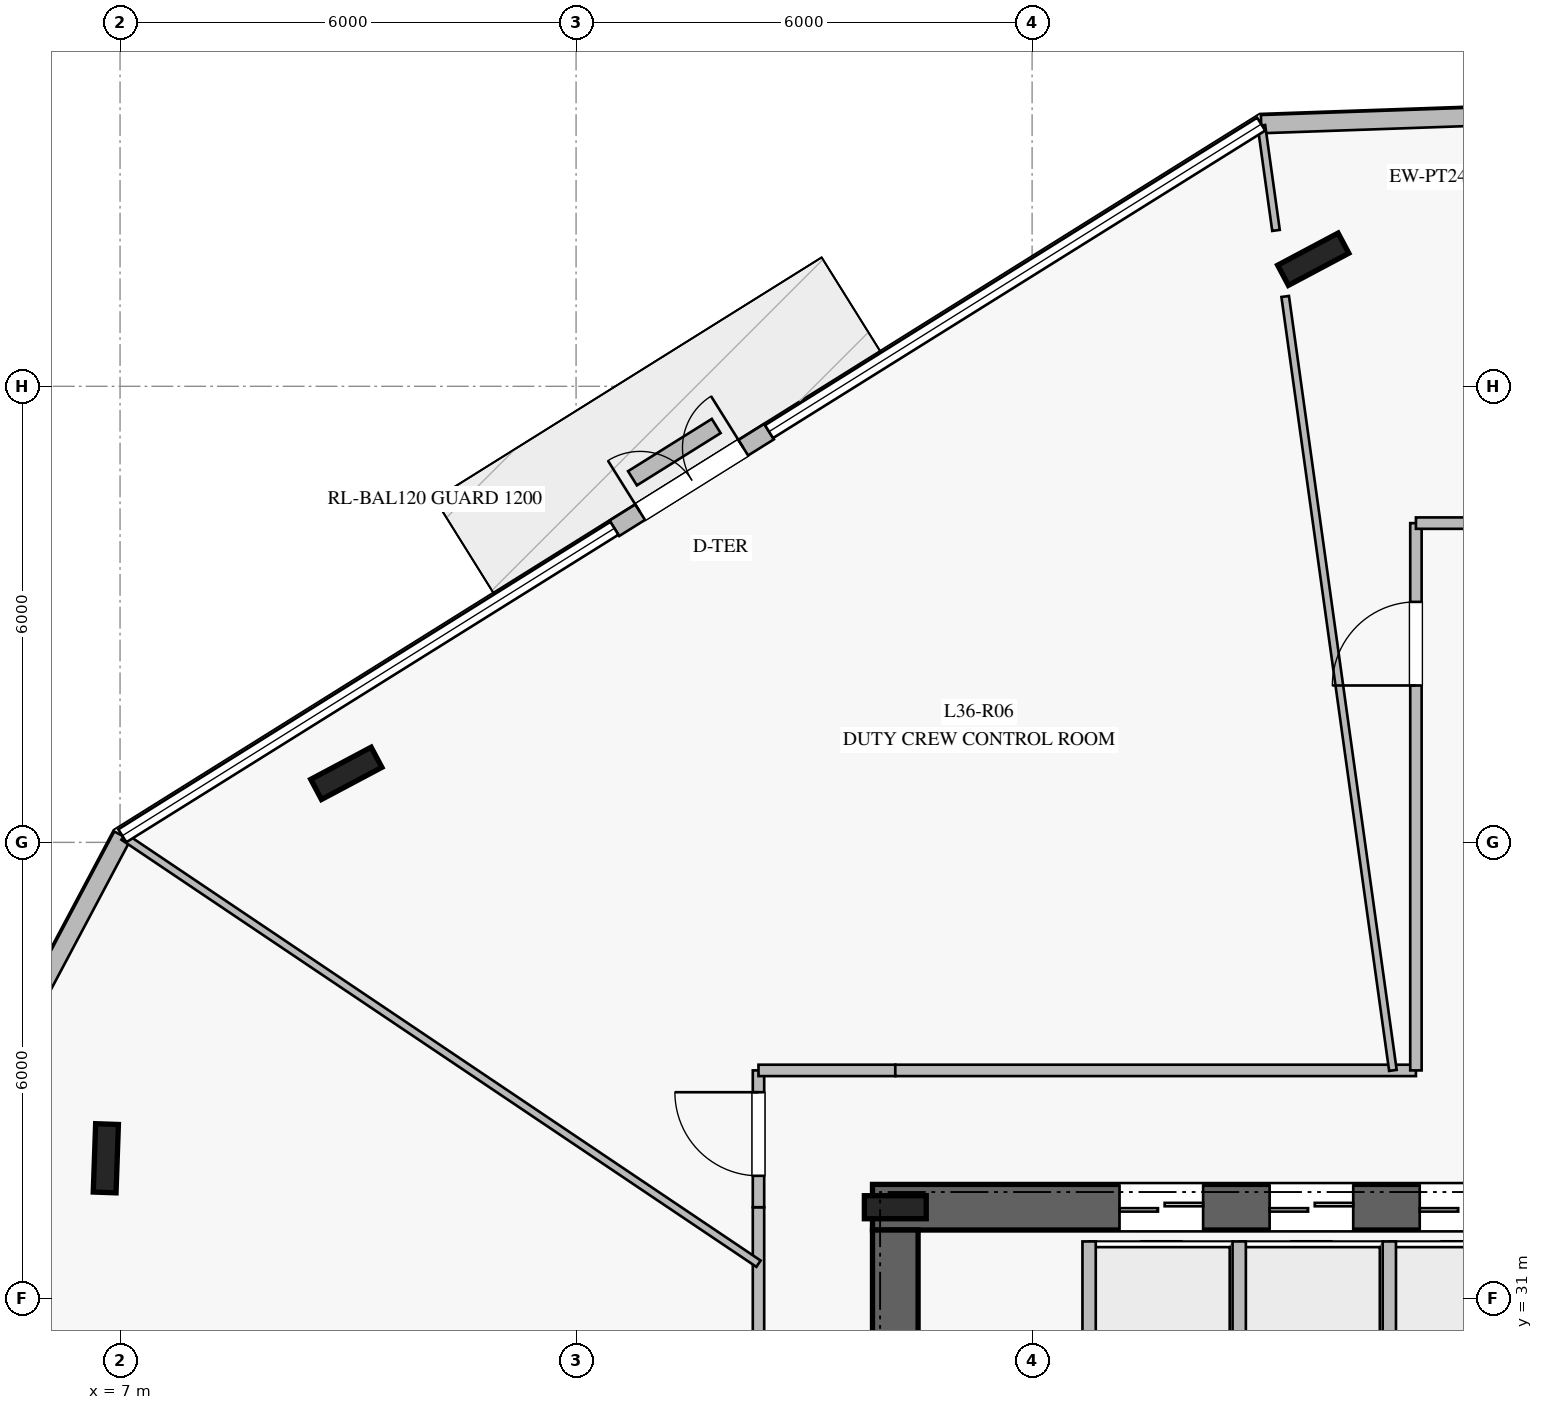
"""IFC4 building model, lengths in metres.
Left out: names, types, materials, properties, quantities, classifications, styles, units other than length and angle.
Written with IfcOpenShell. Run it as: python <this file> out.ifc"""

import sys

from ifc_helpers import new_model, si_unit, direction, frame, frame_2d, origin, origin_2d, place, context, subcontext, project, spatial, rectangle, i_section, extrude, element, fill, save


model = new_model("IFC4")
c1 = context("Model", 3, precision=1e-05, world=origin(), true_north=direction((0.0, 1.0)))
c2 = subcontext(c1, "Body", "Model", "MODEL_VIEW")
j1 = project(units=[si_unit("LENGTHUNIT", "METRE"), si_unit("PLANEANGLEUNIT", "RADIAN")], contexts=[c1])
p1 = place(None, origin())
s1 = spatial("IfcSite", under=j1, at=p1, CompositionType="ELEMENT")
p2 = place(p1, origin())
s2 = spatial("IfcBuilding", under=s1, at=p2, CompositionType="ELEMENT")
p3 = place(p2, frame((0.0, 0.0, 150.4)))
s3 = spatial("IfcBuildingStorey", under=s2, at=p3, CompositionType="ELEMENT", Elevation=150.4)
p4 = place(p3, frame((33.1, 32.2, 0.0), z_axis=(0.0, 0.0, 1.0), x_axis=(-1.0, 0.0, 0.0)))
e1 = element("IfcWall", 1, at=p4, inside=s3, PredefinedType="SHEAR", context=c2, shape_type="SweptSolid", body=[
    extrude(rectangle(XDim=16.2, YDim=0.6, at=frame_2d((8.1, 0.0))), origin(), (0.0, 0.0, 1.0), 3.76),
])
p5 = place(p4, frame((5.05, 0.0, 0.0)))
e2 = element("IfcOpeningElement", 2, at=p5, cuts=e1, PredefinedType="OPENING", context=c2, shape_type="SweptSolid", body=[
    extrude(rectangle(XDim=1.2, YDim=2.25, at=frame_2d((0.6, 1.125))), frame((0.0, 0.31, 0.0), z_axis=(0.0, -1.0, 0.0), x_axis=(1.0, 0.0, 0.0)), (0.0, 0.0, 1.0), 0.62),
])
p6 = place(p4, frame((11.85, 0.0, 0.0)))
e3 = element("IfcOpeningElement", 3, at=p6, cuts=e1, PredefinedType="OPENING", context=c2, shape_type="SweptSolid", body=[
    extrude(rectangle(XDim=1.1, YDim=2.2, at=frame_2d((0.55, 1.1))), frame((0.0, 0.31, 0.0), z_axis=(0.0, -1.0, 0.0), x_axis=(1.0, 0.0, 0.0)), (0.0, 0.0, 1.0), 0.62),
])
p7 = place(p4, frame((9.875, 0.0, 0.0)))
e4 = element("IfcOpeningElement", 4, at=p7, cuts=e1, PredefinedType="OPENING", context=c2, shape_type="SweptSolid", body=[
    extrude(rectangle(XDim=1.1, YDim=2.2, at=frame_2d((0.55, 1.1))), frame((0.0, 0.31, 0.0), z_axis=(0.0, -1.0, 0.0), x_axis=(1.0, 0.0, 0.0)), (0.0, 0.0, 1.0), 0.62),
])
p8 = place(p4, frame((7.9, 0.0, 0.0)))
e5 = element("IfcOpeningElement", 5, at=p8, cuts=e1, PredefinedType="OPENING", context=c2, shape_type="SweptSolid", body=[
    extrude(rectangle(XDim=1.1, YDim=2.2, at=frame_2d((0.55, 1.1))), frame((0.0, 0.31, 0.0), z_axis=(0.0, -1.0, 0.0), x_axis=(1.0, 0.0, 0.0)), (0.0, 0.0, 1.0), 0.62),
])
p9 = place(p3, frame((17.2, 31.9, 0.0), z_axis=(0.0, 0.0, 1.0), x_axis=(0.0, -1.0, 0.0)))
e6 = element("IfcWall", 6, at=p9, inside=s3, PredefinedType="SHEAR", context=c2, shape_type="SweptSolid", body=[
    extrude(rectangle(XDim=13.8, YDim=0.6, at=frame_2d((6.9, 0.0))), origin(), (0.0, 0.0, 1.0), 3.76),
])
p10 = place(p9, frame((2.05, 0.0, 0.0)))
e7 = element("IfcOpeningElement", 7, at=p10, cuts=e6, PredefinedType="OPENING", context=c2, shape_type="SweptSolid", body=[
    extrude(rectangle(XDim=1.5, YDim=2.2, at=frame_2d((0.75, 1.1))), frame((0.0, 0.31, 0.0), z_axis=(0.0, -1.0, 0.0), x_axis=(1.0, 0.0, 0.0)), (0.0, 0.0, 1.0), 0.62),
])
p11 = place(p3, frame((17.2, 32.2, 0.0), z_axis=(0.0, 0.0, 1.0), x_axis=(1.0, 0.0, 0.0)))
e8 = element("IfcColumn", 8, at=p11, inside=s3, PredefinedType="COLUMN", context=c2, shape_type="SweptSolid", body=[
    extrude(i_section(OverallWidth=0.303, OverallDepth=0.814, WebThickness=0.021, FlangeThickness=0.04, at=origin_2d()), origin(), (0.0, 0.0, 1.0), 4.0),
])
for number, where, z_axis, x_axis in (
    (9, (22.699, 44.672, 0.0), (0.0, 0.0, 1.0), (0.883, 0.469, 0.0)),
    (10, (9.977, 37.908, 0.0), (0.0, 0.0, 1.0), (0.883, 0.469, 0.0)),
    (11, (6.813, 32.844, 0.0), (0.0, 0.0, 1.0), (0.035, 0.999, 0.0)),
):
    element("IfcColumn", number, at=place(p3, frame(where, z_axis=z_axis, x_axis=x_axis)), inside=s3, PredefinedType="COLUMN", context=c2, shape_type="SweptSolid", body=[
        extrude(i_section(OverallWidth=0.3, OverallDepth=0.9, WebThickness=0.019, FlangeThickness=0.035, at=origin_2d()), origin(), (0.0, 0.0, 1.0), 4.0),
    ])
p12 = place(p3, frame((26.482, 46.605, 0.0), z_axis=(0.0, 0.0, 1.0), x_axis=(-0.999390988908, -0.034894860495, 0.0)))
e12 = element("IfcWall", 12, at=p12, inside=s3, PredefinedType="STANDARD", context=c2, shape_type="SweptSolid", body=[
    extrude(rectangle(XDim=4.471, YDim=0.24, at=frame_2d((2.235, 0.0))), origin(), (0.0, 0.0, 1.0), 3.76),
])
p13 = place(p3, frame((15.539, 42.404, 0.0), z_axis=(0.0, 0.0, 1.0), x_axis=(-0.847998304005, -0.529998940003, 0.0)))
e13 = element("IfcWall", 13, at=p13, inside=s3, PredefinedType="STANDARD", context=c2, shape_type="SweptSolid", body=[
    extrude(rectangle(XDim=2.4, YDim=0.24, at=frame_2d((1.2, 0.0))), origin(), (0.0, 0.0, 1.0), 3.76),
])
p14 = place(p13, frame((0.4, 0.0, 0.0)))
e14 = element("IfcOpeningElement", 14, at=p14, cuts=e13, PredefinedType="OPENING", context=c2, shape_type="SweptSolid", body=[
    extrude(rectangle(XDim=1.6, YDim=2.25, at=frame_2d((0.8, 1.125))), frame((0.0, 0.13, 0.0), z_axis=(0.0, -1.0, 0.0), x_axis=(1.0, 0.0, 0.0)), (0.0, 0.0, 1.0), 0.26),
])
p15 = place(p3, frame((7.03, 37.087, 0.0), z_axis=(0.0, 0.0, 1.0), x_axis=(-0.46919913514, -0.883092391307, 0.0)))
e15 = element("IfcWall", 15, at=p15, inside=s3, PredefinedType="STANDARD", context=c2, shape_type="SweptSolid", body=[
    extrude(rectangle(XDim=4.472, YDim=0.24, at=frame_2d((2.236, 0.0))), origin(), (0.0, 0.0, 1.0), 3.76),
])
p16 = place(p3, frame((14.844, 42.478, 0.0), z_axis=(0.0, 0.0, 1.0), x_axis=(-0.848272680747, -0.52955968417, 0.0)))
e16 = element("IfcWall", 16, at=p16, inside=s3, PredefinedType="USERDEFINED", context=c2, shape_type="SweptSolid", body=[
    extrude(rectangle(XDim=1.299, YDim=0.22, at=frame_2d((0.649, 0.0))), origin(), (0.0, 0.0, 1.0), 0.4),
])
for number, where, z_axis, x_axis in (
    (17, (19.75, 29.4, 0.0), (0.0, 0.0, 1.0), (0.0, 1.0, 0.0)),
    (18, (21.725, 29.4, 0.0), (0.0, 0.0, 1.0), (0.0, 1.0, 0.0)),
    (19, (23.7, 29.4, 0.0), (0.0, 0.0, 1.0), (0.0, 1.0, 0.0)),
):
    element("IfcWall", number, at=place(p3, frame(where, z_axis=z_axis, x_axis=x_axis)), inside=s3, PredefinedType="PARTITIONING", context=c2, shape_type="SweptSolid", body=[
        extrude(rectangle(XDim=2.35, YDim=0.175, at=frame_2d((1.175, 0.0))), origin(), (0.0, 0.0, 1.0), 3.76),
    ])
p17 = place(p3, frame((15.4, 25.95, 0.0), z_axis=(0.0, 0.0, 1.0), x_axis=(0.0, 1.0, 0.0)))
e20 = element("IfcWall", 20, at=p17, inside=s3, PredefinedType="PARTITIONING", context=c2, shape_type="SweptSolid", body=[
    extrude(rectangle(XDim=6.25, YDim=0.15, at=frame_2d((3.125, 0.0))), origin(), (0.0, 0.0, 1.0), 3.21),
])
p18 = place(p3, frame((15.4, 32.2, 0.0), z_axis=(0.0, 0.0, 1.0), x_axis=(0.0, 1.0, 0.0)))
e21 = element("IfcWall", 21, at=p18, inside=s3, PredefinedType="PARTITIONING", context=c2, shape_type="SweptSolid", body=[
    extrude(rectangle(XDim=1.8, YDim=0.15, at=frame_2d((0.9, 0.0))), origin(), (0.0, 0.0, 1.0), 3.21),
])
p19 = place(p18, frame((0.413, 0.0, 0.0)))
e22 = element("IfcOpeningElement", 22, at=p19, cuts=e21, PredefinedType="OPENING", context=c2, shape_type="SweptSolid", body=[
    extrude(rectangle(XDim=1.1, YDim=2.2, at=frame_2d((0.55, 1.1))), frame((0.0, 0.085, 0.0), z_axis=(0.0, -1.0, 0.0), x_axis=(1.0, 0.0, 0.0)), (0.0, 0.0, 1.0), 0.17),
])
p20 = place(p3, frame((15.4, 34.0, 0.0), z_axis=(0.0, 0.0, 1.0), x_axis=(1.0, 0.0, 0.0)))
e23 = element("IfcWall", 23, at=p20, inside=s3, PredefinedType="PARTITIONING", context=c2, shape_type="SweptSolid", body=[
    extrude(rectangle(XDim=1.8, YDim=0.15, at=frame_2d((0.9, 0.0))), origin(), (0.0, 0.0, 1.0), 3.76),
])
p21 = place(p3, frame((17.2, 34.0, 0.0), z_axis=(0.0, 0.0, 1.0), x_axis=(1.0, 0.0, 0.0)))
e24 = element("IfcWall", 24, at=p21, inside=s3, PredefinedType="PARTITIONING", context=c2, shape_type="SweptSolid", body=[
    extrude(rectangle(XDim=6.85, YDim=0.15, at=frame_2d((3.425, 0.0))), origin(), (0.0, 0.0, 1.0), 3.21),
])
p22 = place(p3, frame((24.05, 34.0, 0.0), z_axis=(0.0, 0.0, 1.0), x_axis=(0.0, 1.0, 0.0)))
e25 = element("IfcWall", 25, at=p22, inside=s3, PredefinedType="PARTITIONING", context=c2, shape_type="SweptSolid", body=[
    extrude(rectangle(XDim=7.2, YDim=0.15, at=frame_2d((3.6, 0.0))), origin(), (0.0, 0.0, 1.0), 3.36),
])
p23 = place(p22, frame((5.064, 0.0, 0.0)))
e26 = element("IfcOpeningElement", 26, at=p23, cuts=e25, PredefinedType="OPENING", context=c2, shape_type="SweptSolid", body=[
    extrude(rectangle(XDim=1.1, YDim=2.2, at=frame_2d((0.55, 1.1))), frame((0.0, 0.085, 0.0), z_axis=(0.0, -1.0, 0.0), x_axis=(1.0, 0.0, 0.0)), (0.0, 0.0, 1.0), 0.17),
])
p24 = place(p3, frame((24.05, 41.2, 0.0), z_axis=(0.0, 0.0, 1.0), x_axis=(1.0, 0.0, 0.0)))
e27 = element("IfcWall", 27, at=p24, inside=s3, PredefinedType="PARTITIONING", context=c2, shape_type="SweptSolid", body=[
    extrude(rectangle(XDim=1.9, YDim=0.15, at=frame_2d((0.95, 0.0))), origin(), (0.0, 0.0, 1.0), 3.76),
])
p25 = place(p3, frame((23.747, 34.0, 0.0), z_axis=(0.0, 0.0, 1.0), x_axis=(-0.137839547671, 0.990454571951, 0.0)))
e28 = element("IfcWall", 28, at=p25, inside=s3, PredefinedType="MOVABLE", context=c2, shape_type="SweptSolid", body=[
    extrude(rectangle(XDim=10.28, YDim=0.1, at=frame_2d((5.14, 0.0))), origin(), (0.0, 0.0, 1.0), 3.16),
])
p26 = place(p3, frame((22.209, 45.051, 0.0), z_axis=(0.0, 0.0, 1.0), x_axis=(-0.137740294841, 0.990468379696, 0.0)))
e29 = element("IfcWall", 29, at=p26, inside=s3, PredefinedType="MOVABLE", context=c2, shape_type="SweptSolid", body=[
    extrude(rectangle(XDim=1.393, YDim=0.1, at=frame_2d((0.697, 0.0))), origin(), (0.0, 0.0, 1.0), 3.76),
])
p27 = place(p3, frame((15.4, 31.457, 0.0), z_axis=(0.0, 0.0, 1.0), x_axis=(-0.829771318012, 0.558103538607, 0.0)))
e30 = element("IfcWall", 30, at=p27, inside=s3, PredefinedType="MOVABLE", context=c2, shape_type="SweptSolid", body=[
    extrude(rectangle(XDim=10.068, YDim=0.1, at=frame_2d((5.034, 0.0))), origin(), (0.0, 0.0, 1.0), 3.16),
])
p28 = place(p14, frame((1.6, 0.0, 0.0), z_axis=(0.0, 0.0, 1.0), x_axis=(-1.0, 0.0, 0.0)))
e31 = element("IfcDoor", 31, at=p28, inside=s3, OperationType="DOUBLE_DOOR_SINGLE_SWING", PredefinedType="DOOR", context=c2, shape_type="SweptSolid", body=[
    extrude(rectangle(XDim=1.6, YDim=2.25, at=frame_2d((0.8, 1.125))), frame((0.0, 0.025, 0.0), z_axis=(0.0, -1.0, 0.0), x_axis=(1.0, 0.0, 0.0)), (0.0, 0.0, 1.0), 0.05),
])
fill(e14, e31)
p29 = place(p6, origin())
e32 = element("IfcDoor", 32, at=p29, inside=s3, OperationType="DOUBLE_DOOR_SLIDING", PredefinedType="DOOR", context=c2, shape_type="SweptSolid", body=[
    extrude(rectangle(XDim=1.1, YDim=2.2, at=frame_2d((0.55, 1.1))), frame((0.0, 0.025, 0.0), z_axis=(0.0, -1.0, 0.0), x_axis=(1.0, 0.0, 0.0)), (0.0, 0.0, 1.0), 0.05),
])
fill(e3, e32)
p30 = place(p7, origin())
e33 = element("IfcDoor", 33, at=p30, inside=s3, OperationType="DOUBLE_DOOR_SLIDING", PredefinedType="DOOR", context=c2, shape_type="SweptSolid", body=[
    extrude(rectangle(XDim=1.1, YDim=2.2, at=frame_2d((0.55, 1.1))), frame((0.0, 0.025, 0.0), z_axis=(0.0, -1.0, 0.0), x_axis=(1.0, 0.0, 0.0)), (0.0, 0.0, 1.0), 0.05),
])
fill(e4, e33)
p31 = place(p8, origin())
e34 = element("IfcDoor", 34, at=p31, inside=s3, OperationType="DOUBLE_DOOR_SLIDING", PredefinedType="DOOR", context=c2, shape_type="SweptSolid", body=[
    extrude(rectangle(XDim=1.1, YDim=2.2, at=frame_2d((0.55, 1.1))), frame((0.0, 0.025, 0.0), z_axis=(0.0, -1.0, 0.0), x_axis=(1.0, 0.0, 0.0)), (0.0, 0.0, 1.0), 0.05),
])
fill(e5, e34)
p32 = place(p23, origin())
e35 = element("IfcDoor", 35, at=p32, inside=s3, OperationType="SINGLE_SWING_LEFT", PredefinedType="DOOR", context=c2, shape_type="SweptSolid", body=[
    extrude(rectangle(XDim=1.1, YDim=2.2, at=frame_2d((0.55, 1.1))), frame((0.0, 0.025, 0.0), z_axis=(0.0, -1.0, 0.0), x_axis=(1.0, 0.0, 0.0)), (0.0, 0.0, 1.0), 0.05),
])
fill(e26, e35)
p33 = place(p19, origin())
e36 = element("IfcDoor", 36, at=p33, inside=s3, OperationType="SINGLE_SWING_RIGHT", PredefinedType="DOOR", context=c2, shape_type="SweptSolid", body=[
    extrude(rectangle(XDim=1.1, YDim=2.2, at=frame_2d((0.55, 1.1))), frame((0.0, 0.025, 0.0), z_axis=(0.0, -1.0, 0.0), x_axis=(1.0, 0.0, 0.0)), (0.0, 0.0, 1.0), 0.05),
])
fill(e22, e36)
save(model, sys.argv[1])
